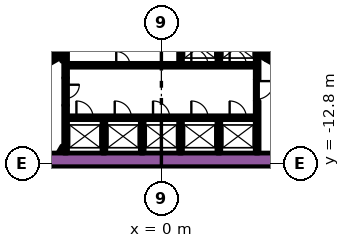
"""IFC4 building model, lengths in metres.
Left out: names, types, materials, properties, quantities, classifications, styles, units other than length and angle.
Written with IfcOpenShell. Run it as: python <this file> out.ifc"""

import sys

from ifc_helpers import new_model, si_unit, direction, frame, frame_2d, origin, place, context, subcontext, project, spatial, rectangle, extrude, element, fill, save


model = new_model("IFC4")
c1 = context("Model", 3, precision=1e-05, world=origin(), true_north=direction((0.0, 1.0)))
c2 = subcontext(c1, "Body", "Model", "MODEL_VIEW")
j1 = project(units=[si_unit("LENGTHUNIT", "METRE"), si_unit("PLANEANGLEUNIT", "RADIAN")], contexts=[c1])
p1 = place(None, origin())
s1 = spatial("IfcSite", under=j1, at=p1, CompositionType="ELEMENT")
p2 = place(p1, origin())
s2 = spatial("IfcBuilding", under=s1, at=p2, CompositionType="ELEMENT")
p3 = place(p2, origin())
s3 = spatial("IfcBuildingStorey", under=s2, at=p3, CompositionType="ELEMENT", Elevation=0.0)
p4 = place(p3, frame((-12.019, -12.55, -1.8), z_axis=(0.0, 0.0, 1.0), x_axis=(1.0, 0.0, 0.0)))
e1 = element("IfcWall", 1, at=p4, inside=s3, PredefinedType="SOLIDWALL", context=c2, shape_type="SweptSolid", body=[
    extrude(rectangle(XDim=21.63, YDim=0.9, at=frame_2d((10.815, 0.0))), origin(), (0.0, 0.0, 1.0), 7.8),
])
p5 = place(p3, frame((12.84, -9.261, 0.0), z_axis=(0.0, 0.0, 1.0), x_axis=(-0.866013990052, 0.500019768644, 0.0)))
e2 = element("IfcWall", 2, at=p5, inside=s3, PredefinedType="SOLIDWALL", context=c2, shape_type="SweptSolid", body=[
    extrude(rectangle(XDim=6.8, YDim=0.25, at=frame_2d((3.4, 0.0))), origin(), (0.0, 0.0, 1.0), 6.0),
])
p6 = place(p3, frame((6.78, -5.906, 0.0), z_axis=(0.0, 0.0, 1.0), x_axis=(0.500223362819, 0.865896406789, 0.0)))
e3 = element("IfcWall", 3, at=p6, inside=s3, PredefinedType="SOLIDWALL", context=c2, shape_type="SweptSolid", body=[
    extrude(rectangle(XDim=0.675, YDim=0.25, at=frame_2d((0.337, 0.0))), origin(), (0.0, 0.0, 1.0), 6.0),
])
p7 = place(p3, frame((-12.84, -9.261, 0.0), z_axis=(0.0, 0.0, 1.0), x_axis=(0.866016039709, 0.500016218704, 0.0)))
e4 = element("IfcWall", 4, at=p7, inside=s3, PredefinedType="SOLIDWALL", context=c2, shape_type="SweptSolid", body=[
    extrude(rectangle(XDim=7.05, YDim=0.25, at=frame_2d((3.525, 0.0))), origin(), (0.0, 0.0, 1.0), 6.0),
])
p8 = place(p3, frame((-6.905, -5.69, 0.0), z_axis=(0.0, 0.0, 1.0), x_axis=(-0.500402024738, 0.865793170242, 0.0)))
e5 = element("IfcWall", 5, at=p8, inside=s3, PredefinedType="SOLIDWALL", context=c2, shape_type="SweptSolid", body=[
    extrude(rectangle(XDim=0.425, YDim=0.25, at=frame_2d((0.212, 0.0))), origin(), (0.0, 0.0, 1.0), 6.0),
])
p9 = place(p3, frame((-3.78, -12.1, -1.8), z_axis=(0.0, 0.0, 1.0), x_axis=(0.0, 1.0, 0.0)))
e6 = element("IfcWall", 6, at=p9, inside=s3, PredefinedType="SOLIDWALL", context=c2, shape_type="SweptSolid", body=[
    extrude(rectangle(XDim=2.2, YDim=0.25, at=frame_2d((1.1, 0.0))), origin(), (0.0, 0.0, 1.0), 7.8),
])
p10 = place(p3, frame((-6.3, -12.1, -1.8), z_axis=(0.0, 0.0, 1.0), x_axis=(0.0, 1.0, 0.0)))
e7 = element("IfcWall", 7, at=p10, inside=s3, PredefinedType="SOLIDWALL", context=c2, shape_type="SweptSolid", body=[
    extrude(rectangle(XDim=3.146, YDim=0.25, at=frame_2d((1.573, 0.0))), origin(), (0.0, 0.0, 1.0), 7.8),
])
p11 = place(p3, frame((6.3, -8.67, -1.8), z_axis=(0.0, 0.0, 1.0), x_axis=(0.0, -1.0, 0.0)))
e8 = element("IfcWall", 8, at=p11, inside=s3, PredefinedType="SOLIDWALL", context=c2, shape_type="SweptSolid", body=[
    extrude(rectangle(XDim=3.43, YDim=0.25, at=frame_2d((1.715, 0.0))), origin(), (0.0, 0.0, 1.0), 7.8),
])
p12 = place(p3, frame((6.3, -7.268, -1.8), z_axis=(0.0, 0.0, 1.0), x_axis=(0.0, 1.0, 0.0)))
e9 = element("IfcWall", 9, at=p12, inside=s3, PredefinedType="SOLIDWALL", context=c2, shape_type="SweptSolid", body=[
    extrude(rectangle(XDim=3.268, YDim=0.25, at=frame_2d((1.634, 0.0))), origin(), (0.0, 0.0, 1.0), 7.8),
])
for number, where, z_axis, x_axis in (
    (10, (3.78, -4.0, -1.8), (0.0, 0.0, 1.0), (0.0, -1.0, 0.0)),
    (11, (1.26, -4.0, -1.8), (0.0, 0.0, 1.0), (0.0, -1.0, 0.0)),
):
    element("IfcWall", number, at=place(p3, frame(where, z_axis=z_axis, x_axis=x_axis)), inside=s3, PredefinedType="SOLIDWALL", context=c2, shape_type="SweptSolid", body=[
        extrude(rectangle(XDim=2.2, YDim=0.25, at=frame_2d((1.1, 0.0))), origin(), (0.0, 0.0, 1.0), 7.8),
    ])
p13 = place(p3, frame((-6.3, -4.0, -1.8), z_axis=(0.0, 0.0, 1.0), x_axis=(0.0, -1.0, 0.0)))
e12 = element("IfcWall", 12, at=p13, inside=s3, PredefinedType="SOLIDWALL", context=c2, shape_type="SweptSolid", body=[
    extrude(rectangle(XDim=3.154, YDim=0.25, at=frame_2d((1.577, 0.0))), origin(), (0.0, 0.0, 1.0), 7.8),
])
for number, where, z_axis, x_axis in (
    (13, (3.78, -12.1, -1.8), (0.0, 0.0, 1.0), (0.0, 1.0, 0.0)),
    (14, (1.26, -12.1, -1.8), (0.0, 0.0, 1.0), (0.0, 1.0, 0.0)),
    (15, (-1.26, -12.1, -1.8), (0.0, 0.0, 1.0), (0.0, 1.0, 0.0)),
):
    element("IfcWall", number, at=place(p3, frame(where, z_axis=z_axis, x_axis=x_axis)), inside=s3, PredefinedType="SOLIDWALL", context=c2, shape_type="SweptSolid", body=[
        extrude(rectangle(XDim=2.2, YDim=0.25, at=frame_2d((1.1, 0.0))), origin(), (0.0, 0.0, 1.0), 7.8),
    ])
p14 = place(p3, frame((-6.708, -12.068, 0.0), z_axis=(0.0, 0.0, 1.0), x_axis=(0.500000789788, 0.8660249478, 0.0)))
e16 = element("IfcWall", 16, at=p14, inside=s3, PredefinedType="PARTITIONING", context=c2, shape_type="SweptSolid", body=[
    extrude(rectangle(XDim=0.456, YDim=0.15, at=frame_2d((0.228, 0.0))), origin(), (0.0, 0.0, 1.0), 5.1),
])
p15 = place(p3, frame((-6.534, -12.068, 0.0), z_axis=(0.0, 0.0, 1.0), x_axis=(0.500240224089, 0.865886665912, 0.0)))
e17 = element("IfcWall", 17, at=p15, inside=s3, PredefinedType="PARTITIONING", context=c2, shape_type="SweptSolid", body=[
    extrude(rectangle(XDim=0.109, YDim=0.15, at=frame_2d((0.054, 0.0))), origin(), (0.0, 0.0, 1.0), 5.1),
])
p16 = place(p3, frame((-6.48, -6.027, -1.8), z_axis=(0.0, 0.0, 1.0), x_axis=(-0.499927229454, 0.866067413802, 0.0)))
e18 = element("IfcWall", 18, at=p16, inside=s3, PredefinedType="PARTITIONING", context=c2, shape_type="SweptSolid", body=[
    extrude(rectangle(XDim=0.929, YDim=0.15, at=frame_2d((0.464, 0.0))), origin(), (0.0, 0.0, 1.0), 7.8),
])
p17 = place(p3, frame((6.945, -5.222, 0.0), z_axis=(0.0, 0.0, 1.0), x_axis=(-0.499818422106, -0.866130212453, 0.0)))
e19 = element("IfcWall", 19, at=p17, inside=s3, PredefinedType="PARTITIONING", context=c2, shape_type="SweptSolid", body=[
    extrude(rectangle(XDim=0.514, YDim=0.15, at=frame_2d((0.257, 0.0))), origin(), (0.0, 0.0, 1.0), 5.1),
])
p18 = place(p3, frame((-6.175, -9.775, -1.8), z_axis=(0.0, 0.0, 1.0), x_axis=(1.0, 0.0, 0.0)))
e20 = element("IfcWall", 20, at=p18, inside=s3, PredefinedType="SOLIDWALL", context=c2, shape_type="SweptSolid", body=[
    extrude(rectangle(XDim=12.35, YDim=0.25, at=frame_2d((6.175, 0.0))), origin(), (0.0, 0.0, 1.0), 7.8),
])
p19 = place(p18, frame((0.585, 0.0, 1.8)))
e21 = element("IfcOpeningElement", 21, at=p19, cuts=e20, PredefinedType="OPENING", context=c2, shape_type="SweptSolid", body=[
    extrude(rectangle(XDim=1.1, YDim=2.1, at=frame_2d((0.55, 1.05))), frame((0.0, 0.135, 0.0), z_axis=(0.0, -1.0, 0.0), x_axis=(1.0, 0.0, 0.0)), (0.0, 0.0, 1.0), 0.27),
])
p20 = place(p18, frame((3.105, 0.0, 1.8)))
e22 = element("IfcOpeningElement", 22, at=p20, cuts=e20, PredefinedType="OPENING", context=c2, shape_type="SweptSolid", body=[
    extrude(rectangle(XDim=1.1, YDim=2.1, at=frame_2d((0.55, 1.05))), frame((0.0, 0.135, 0.0), z_axis=(0.0, -1.0, 0.0), x_axis=(1.0, 0.0, 0.0)), (0.0, 0.0, 1.0), 0.27),
])
p21 = place(p18, frame((5.625, 0.0, 1.8)))
e23 = element("IfcOpeningElement", 23, at=p21, cuts=e20, PredefinedType="OPENING", context=c2, shape_type="SweptSolid", body=[
    extrude(rectangle(XDim=1.1, YDim=2.1, at=frame_2d((0.55, 1.05))), frame((0.0, 0.135, 0.0), z_axis=(0.0, -1.0, 0.0), x_axis=(1.0, 0.0, 0.0)), (0.0, 0.0, 1.0), 0.27),
])
p22 = place(p18, frame((8.145, 0.0, 1.8)))
e24 = element("IfcOpeningElement", 24, at=p22, cuts=e20, PredefinedType="OPENING", context=c2, shape_type="SweptSolid", body=[
    extrude(rectangle(XDim=1.1, YDim=2.1, at=frame_2d((0.55, 1.05))), frame((0.0, 0.135, 0.0), z_axis=(0.0, -1.0, 0.0), x_axis=(1.0, 0.0, 0.0)), (0.0, 0.0, 1.0), 0.27),
])
p23 = place(p18, frame((10.665, 0.0, 1.8)))
e25 = element("IfcOpeningElement", 25, at=p23, cuts=e20, PredefinedType="OPENING", context=c2, shape_type="SweptSolid", body=[
    extrude(rectangle(XDim=1.1, YDim=2.1, at=frame_2d((0.55, 1.05))), frame((0.0, 0.135, 0.0), z_axis=(0.0, -1.0, 0.0), x_axis=(1.0, 0.0, 0.0)), (0.0, 0.0, 1.0), 0.27),
])
p24 = place(p3, frame((-6.175, -6.325, -1.8), z_axis=(0.0, 0.0, 1.0), x_axis=(1.0, 0.0, 0.0)))
e26 = element("IfcWall", 26, at=p24, inside=s3, PredefinedType="SOLIDWALL", context=c2, shape_type="SweptSolid", body=[
    extrude(rectangle(XDim=12.35, YDim=0.25, at=frame_2d((6.175, 0.0))), origin(), (0.0, 0.0, 1.0), 7.8),
])
p25 = place(p24, frame((3.205, 0.0, 1.8)))
e27 = element("IfcOpeningElement", 27, at=p25, cuts=e26, PredefinedType="OPENING", context=c2, shape_type="SweptSolid", body=[
    extrude(rectangle(XDim=0.9, YDim=2.1, at=frame_2d((0.45, 1.05))), frame((0.0, 0.135, 0.0), z_axis=(0.0, -1.0, 0.0), x_axis=(1.0, 0.0, 0.0)), (0.0, 0.0, 1.0), 0.27),
])
p26 = place(p24, frame((8.145, 0.0, 1.8)))
e28 = element("IfcOpeningElement", 28, at=p26, cuts=e26, PredefinedType="OPENING", context=c2, shape_type="SweptSolid", body=[
    extrude(rectangle(XDim=1.1, YDim=2.1, at=frame_2d((0.55, 1.05))), frame((0.0, 0.135, 0.0), z_axis=(0.0, -1.0, 0.0), x_axis=(1.0, 0.0, 0.0)), (0.0, 0.0, 1.0), 0.27),
])
p27 = place(p24, frame((10.665, 0.0, 1.8)))
e29 = element("IfcOpeningElement", 29, at=p27, cuts=e26, PredefinedType="OPENING", context=c2, shape_type="SweptSolid", body=[
    extrude(rectangle(XDim=1.1, YDim=2.1, at=frame_2d((0.55, 1.05))), frame((0.0, 0.135, 0.0), z_axis=(0.0, -1.0, 0.0), x_axis=(1.0, 0.0, 0.0)), (0.0, 0.0, 1.0), 0.27),
])
p28 = place(p3, frame((-6.3, -7.154, -1.8), z_axis=(0.0, 0.0, 1.0), x_axis=(0.0, -1.0, 0.0)))
e30 = element("IfcWall", 30, at=p28, inside=s3, PredefinedType="SOLIDWALL", context=c2, shape_type="SweptSolid", body=[
    extrude(rectangle(XDim=1.8, YDim=0.25, at=frame_2d((0.9, 0.0))), origin(), (0.0, 0.0, 1.0), 7.8),
])
p29 = place(p28, frame((0.45, 0.0, 1.8)))
e31 = element("IfcOpeningElement", 31, at=p29, cuts=e30, PredefinedType="OPENING", context=c2, shape_type="SweptSolid", body=[
    extrude(rectangle(XDim=0.9, YDim=2.1, at=frame_2d((0.45, 1.05))), frame((0.0, 0.135, 0.0), z_axis=(0.0, -1.0, 0.0), x_axis=(1.0, 0.0, 0.0)), (0.0, 0.0, 1.0), 0.27),
])
p30 = place(p3, frame((6.22, -7.266, 0.0), z_axis=(0.0, 0.0, 1.0), x_axis=(0.0, -1.0, 0.0)))
e32 = element("IfcWall", 32, at=p30, inside=s3, PredefinedType="PARTITIONING", context=c2, shape_type="SweptSolid", body=[
    extrude(rectangle(XDim=1.4, YDim=0.09, at=frame_2d((0.7, 0.0))), origin(), (0.0, 0.0, 1.0), 5.1),
])
p31 = place(p30, frame((0.1, 0.0, 0.0)))
e33 = element("IfcOpeningElement", 33, at=p31, cuts=e32, PredefinedType="OPENING", context=c2, shape_type="SweptSolid", body=[
    extrude(rectangle(XDim=1.2, YDim=2.1, at=frame_2d((0.6, 1.05))), frame((0.0, 0.055, 0.0), z_axis=(0.0, -1.0, 0.0), x_axis=(1.0, 0.0, 0.0)), (0.0, 0.0, 1.0), 0.11),
])
p32 = place(p19, origin())
e34 = element("IfcDoor", 34, at=p32, inside=s3, OperationType="DOUBLE_DOOR_SLIDING", PredefinedType="DOOR", context=c2, shape_type="SweptSolid", body=[
    extrude(rectangle(XDim=1.1, YDim=2.1, at=frame_2d((0.55, 1.05))), frame((0.0, 0.025, 0.0), z_axis=(0.0, -1.0, 0.0), x_axis=(1.0, 0.0, 0.0)), (0.0, 0.0, 1.0), 0.05),
])
fill(e21, e34)
p33 = place(p20, origin())
e35 = element("IfcDoor", 35, at=p33, inside=s3, OperationType="DOUBLE_DOOR_SLIDING", PredefinedType="DOOR", context=c2, shape_type="SweptSolid", body=[
    extrude(rectangle(XDim=1.1, YDim=2.1, at=frame_2d((0.55, 1.05))), frame((0.0, 0.025, 0.0), z_axis=(0.0, -1.0, 0.0), x_axis=(1.0, 0.0, 0.0)), (0.0, 0.0, 1.0), 0.05),
])
fill(e22, e35)
p34 = place(p21, origin())
e36 = element("IfcDoor", 36, at=p34, inside=s3, OperationType="DOUBLE_DOOR_SLIDING", PredefinedType="DOOR", context=c2, shape_type="SweptSolid", body=[
    extrude(rectangle(XDim=1.1, YDim=2.1, at=frame_2d((0.55, 1.05))), frame((0.0, 0.025, 0.0), z_axis=(0.0, -1.0, 0.0), x_axis=(1.0, 0.0, 0.0)), (0.0, 0.0, 1.0), 0.05),
])
fill(e23, e36)
p35 = place(p22, origin())
e37 = element("IfcDoor", 37, at=p35, inside=s3, OperationType="DOUBLE_DOOR_SLIDING", PredefinedType="DOOR", context=c2, shape_type="SweptSolid", body=[
    extrude(rectangle(XDim=1.1, YDim=2.1, at=frame_2d((0.55, 1.05))), frame((0.0, 0.025, 0.0), z_axis=(0.0, -1.0, 0.0), x_axis=(1.0, 0.0, 0.0)), (0.0, 0.0, 1.0), 0.05),
])
fill(e24, e37)
p36 = place(p23, origin())
e38 = element("IfcDoor", 38, at=p36, inside=s3, OperationType="DOUBLE_DOOR_SLIDING", PredefinedType="DOOR", context=c2, shape_type="SweptSolid", body=[
    extrude(rectangle(XDim=1.1, YDim=2.1, at=frame_2d((0.55, 1.05))), frame((0.0, 0.025, 0.0), z_axis=(0.0, -1.0, 0.0), x_axis=(1.0, 0.0, 0.0)), (0.0, 0.0, 1.0), 0.05),
])
fill(e25, e38)
p37 = place(p25, origin())
e39 = element("IfcDoor", 39, at=p37, inside=s3, OperationType="SINGLE_SWING_LEFT", PredefinedType="DOOR", context=c2, shape_type="SweptSolid", body=[
    extrude(rectangle(XDim=0.9, YDim=2.1, at=frame_2d((0.45, 1.05))), frame((0.0, 0.025, 0.0), z_axis=(0.0, -1.0, 0.0), x_axis=(1.0, 0.0, 0.0)), (0.0, 0.0, 1.0), 0.05),
])
fill(e27, e39)
p38 = place(p26, origin())
e40 = element("IfcDoor", 40, at=p38, inside=s3, OperationType="DOUBLE_DOOR_SLIDING", PredefinedType="DOOR", context=c2, shape_type="SweptSolid", body=[
    extrude(rectangle(XDim=1.1, YDim=2.1, at=frame_2d((0.55, 1.05))), frame((0.0, 0.025, 0.0), z_axis=(0.0, -1.0, 0.0), x_axis=(1.0, 0.0, 0.0)), (0.0, 0.0, 1.0), 0.05),
])
fill(e28, e40)
p39 = place(p27, origin())
e41 = element("IfcDoor", 41, at=p39, inside=s3, OperationType="DOUBLE_DOOR_SLIDING", PredefinedType="DOOR", context=c2, shape_type="SweptSolid", body=[
    extrude(rectangle(XDim=1.1, YDim=2.1, at=frame_2d((0.55, 1.05))), frame((0.0, 0.025, 0.0), z_axis=(0.0, -1.0, 0.0), x_axis=(1.0, 0.0, 0.0)), (0.0, 0.0, 1.0), 0.05),
])
fill(e29, e41)
p40 = place(p29, origin())
e42 = element("IfcDoor", 42, at=p40, inside=s3, OperationType="SINGLE_SWING_LEFT", PredefinedType="DOOR", context=c2, shape_type="SweptSolid", body=[
    extrude(rectangle(XDim=0.9, YDim=2.1, at=frame_2d((0.45, 1.05))), frame((0.0, 0.025, 0.0), z_axis=(0.0, -1.0, 0.0), x_axis=(1.0, 0.0, 0.0)), (0.0, 0.0, 1.0), 0.05),
])
fill(e31, e42)
p41 = place(p31, origin())
e43 = element("IfcDoor", 43, at=p41, inside=s3, OperationType="SINGLE_SWING_LEFT", PredefinedType="DOOR", context=c2, shape_type="SweptSolid", body=[
    extrude(rectangle(XDim=1.2, YDim=2.1, at=frame_2d((0.6, 1.05))), frame((0.0, 0.025, 0.0), z_axis=(0.0, -1.0, 0.0), x_axis=(1.0, 0.0, 0.0)), (0.0, 0.0, 1.0), 0.05),
])
fill(e33, e43)
save(model, sys.argv[1])
